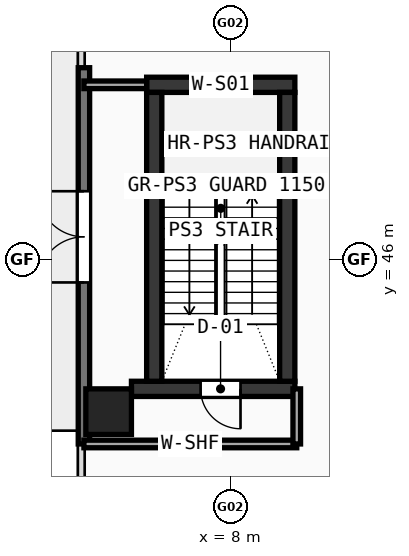
"""IFC4 building model, lengths in metres.
Left out: names, types, materials, properties, quantities, classifications, styles, units other than length and angle.
Written with IfcOpenShell. Run it as: python <this file> out.ifc"""

import sys

from ifc_helpers import new_model, si_unit, direction, frame, frame_2d, origin, origin_with_axes, origin_2d, place, context, subcontext, project, spatial, rectangle, hollow_rectangle, extrude, source, transform, mapped, element, fill, save


model = new_model("IFC4")
c1 = context("Model", 3, precision=1e-05, world=origin(), true_north=direction((0.0, 1.0)))
c2 = subcontext(c1, "Body", "Model", "MODEL_VIEW")
j1 = project(units=[si_unit("LENGTHUNIT", "METRE"), si_unit("PLANEANGLEUNIT", "RADIAN")], contexts=[c1])
p1 = place(None, origin())
s1 = spatial("IfcSite", under=j1, at=p1, CompositionType="ELEMENT")
p2 = place(p1, origin())
s2 = spatial("IfcBuilding", under=s1, at=p2, CompositionType="ELEMENT")
p3 = place(p2, origin())
s3 = spatial("IfcBuildingStorey", under=s2, at=p3, CompositionType="ELEMENT", Elevation=0.0)
p4 = place(p3, frame((5.8, 50.6, 0.0), z_axis=(0.0, 0.0, 1.0), x_axis=(1.0, 0.0, 0.0)))
e1 = element("IfcWall", 1, at=p4, inside=s3, PredefinedType="SHEAR", context=c2, shape_type="SweptSolid", body=[
    extrude(rectangle(XDim=3.9, YDim=0.4, at=frame_2d((1.95, 0.0))), origin(), (0.0, 0.0, 1.0), 4.52),
])
p5 = place(p3, frame((5.4, 42.6, 0.0), z_axis=(0.0, 0.0, 1.0), x_axis=(1.0, 0.0, 0.0)))
e2 = element("IfcWall", 2, at=p5, inside=s3, PredefinedType="SHEAR", context=c2, shape_type="SweptSolid", body=[
    extrude(rectangle(XDim=4.3, YDim=0.4, at=frame_2d((2.15, 0.0))), origin(), (0.0, 0.0, 1.0), 4.52),
])
p6 = place(p5, frame((1.82, 0.0, 0.0)))
e3 = element("IfcOpeningElement", 3, at=p6, cuts=e2, PredefinedType="OPENING", context=c2, shape_type="SweptSolid", body=[
    extrude(rectangle(XDim=1.05, YDim=2.1, at=frame_2d((0.525, 1.05))), frame((0.0, 0.21, 0.0), z_axis=(0.0, -1.0, 0.0), x_axis=(1.0, 0.0, 0.0)), (0.0, 0.0, 1.0), 0.42),
])
for number, where, z_axis, x_axis in (
    (4, (6.0, 42.8, 0.0), (0.0, 0.0, 1.0), (0.0, 1.0, 0.0)),
    (5, (9.5, 42.8, 0.0), (0.0, 0.0, 1.0), (0.0, 1.0, 0.0)),
):
    element("IfcWall", number, at=place(p3, frame(where, z_axis=z_axis, x_axis=x_axis)), inside=s3, PredefinedType="SHEAR", context=c2, shape_type="SweptSolid", body=[
        extrude(rectangle(XDim=7.6, YDim=0.4, at=frame_2d((3.8, 0.0))), origin(), (0.0, 0.0, 1.0), 4.52),
    ])
m1 = source(origin(), c2, "Body", "SweptSolid", [
    extrude(hollow_rectangle(XDim=1.2, YDim=1.2, WallThickness=0.05, at=origin_2d()), origin(), (0.0, 0.0, 1.0), 4.8),
])
p7 = place(p3, frame((4.8, 42.0, -0.28), z_axis=(0.0, 0.0, 1.0), x_axis=(1.0, 0.0, 0.0)))
e6 = element("IfcColumn", 6, at=p7, inside=s3, PredefinedType="COLUMN", context=c2, shape_type="MappedRepresentation", body=[
    mapped(m1, transform((0.0, 0.0, 0.0), scale=1.0)),
])
p8 = place(p3, frame((4.15, 41.15, 0.0), z_axis=(0.0, 0.0, 1.0), x_axis=(0.0, 1.0, 0.0)))
e7 = element("IfcWall", 7, at=p8, inside=s3, PredefinedType="STANDARD", context=c2, shape_type="SweptSolid", body=[
    extrude(rectangle(XDim=9.9, YDim=0.3, at=frame_2d((4.95, 0.0))), origin(), (0.0, 0.0, 1.0), 4.52),
])
p9 = place(p8, frame((4.25, 0.0, 0.0)))
e8 = element("IfcOpeningElement", 8, at=p9, cuts=e7, PredefinedType="OPENING", context=c2, shape_type="SweptSolid", body=[
    extrude(rectangle(XDim=2.4, YDim=2.2, at=frame_2d((1.2, 1.1))), frame((0.0, 0.16, 0.0), z_axis=(0.0, -1.0, 0.0), x_axis=(1.0, 0.0, 0.0)), (0.0, 0.0, 1.0), 0.32),
])
p10 = place(p3, frame((4.15, 41.15, 0.0), z_axis=(0.0, 0.0, 1.0), x_axis=(1.0, 0.0, 0.0)))
e9 = element("IfcWall", 9, at=p10, inside=s3, PredefinedType="SOLIDWALL", context=c2, shape_type="SweptSolid", body=[
    extrude(rectangle(XDim=5.6, YDim=0.2, at=frame_2d((2.8, 0.0))), origin(), (0.0, 0.0, 1.0), 3.72),
])
p11 = place(p3, frame((9.75, 41.15, 0.0), z_axis=(0.0, 0.0, 1.0), x_axis=(0.0, 1.0, 0.0)))
e10 = element("IfcWall", 10, at=p11, inside=s3, PredefinedType="SOLIDWALL", context=c2, shape_type="SweptSolid", body=[
    extrude(rectangle(XDim=1.45, YDim=0.2, at=frame_2d((0.725, 0.0))), origin(), (0.0, 0.0, 1.0), 3.62),
])
p12 = place(p3, frame((4.15, 50.6, 0.0), z_axis=(0.0, 0.0, 1.0), x_axis=(1.0, 0.0, 0.0)))
e11 = element("IfcWall", 11, at=p12, inside=s3, PredefinedType="SOLIDWALL", context=c2, shape_type="SweptSolid", body=[
    extrude(rectangle(XDim=1.65, YDim=0.2, at=frame_2d((0.825, 0.0))), origin(), (0.0, 0.0, 1.0), 3.72),
])
m2 = source(origin(), c2, "Body", "SweptSolid", [
    extrude(rectangle(XDim=2.4, YDim=2.2, at=frame_2d((1.2, 1.1))), frame((0.0, 0.025, 0.0), z_axis=(0.0, -1.0, 0.0), x_axis=(1.0, 0.0, 0.0)), (0.0, 0.0, 1.0), 0.05),
])
p13 = place(p9, origin_with_axes())
e12 = element("IfcDoor", 12, at=p13, inside=s3, OperationType="DOUBLE_DOOR_SINGLE_SWING", PredefinedType="DOOR", context=c2, shape_type="MappedRepresentation", body=[
    mapped(m2, transform((0.0, 0.0, 0.0), scale=1.0)),
])
fill(e8, e12)
m3 = source(origin(), c2, "Body", "SweptSolid", [
    extrude(rectangle(XDim=1.05, YDim=2.1, at=frame_2d((0.525, 1.05))), frame((0.0, 0.025, 0.0), z_axis=(0.0, -1.0, 0.0), x_axis=(1.0, 0.0, 0.0)), (0.0, 0.0, 1.0), 0.05),
])
p14 = place(p6, frame((1.05, 0.0, 0.0), z_axis=(0.0, 0.0, 1.0), x_axis=(-1.0, 0.0, 0.0)))
e13 = element("IfcDoor", 13, at=p14, inside=s3, OperationType="SINGLE_SWING_LEFT", PredefinedType="DOOR", context=c2, shape_type="MappedRepresentation", body=[
    mapped(m3, transform((0.0, 0.0, 0.0), scale=1.0)),
])
fill(e3, e13)
save(model, sys.argv[1])
